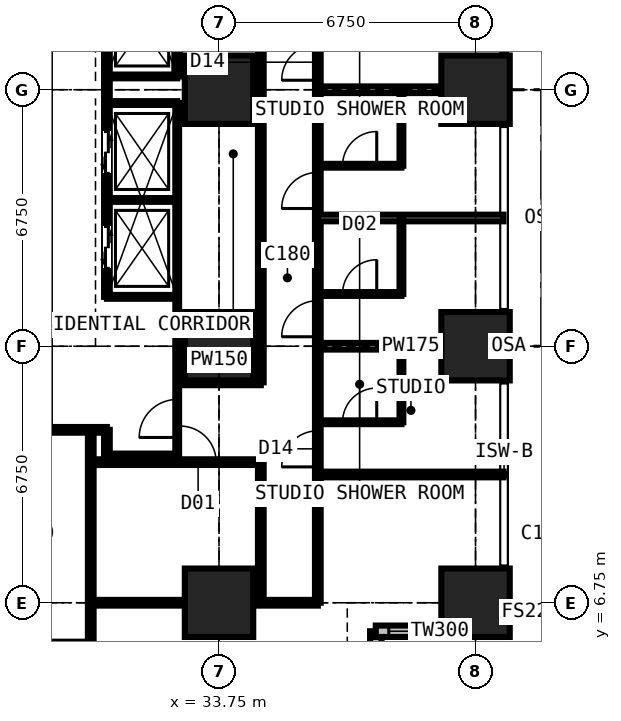
"""IFC4 building model, lengths in metres.
Left out: names, types, materials, properties, quantities, classifications, styles, units other than length and angle.
Written with IfcOpenShell. Run it as: python <this file> out.ifc"""

import sys

from ifc_helpers import new_model, si_unit, direction, frame, frame_2d, origin, origin_2d, place, context, subcontext, project, spatial, rectangle, extrude, element, fill, save


model = new_model("IFC4")
c1 = context("Model", 3, precision=1e-05, world=origin(), true_north=direction((0.0, 1.0)))
c2 = subcontext(c1, "Body", "Model", "MODEL_VIEW")
j1 = project(units=[si_unit("LENGTHUNIT", "METRE"), si_unit("PLANEANGLEUNIT", "RADIAN")], contexts=[c1])
p1 = place(None, origin())
s1 = spatial("IfcSite", under=j1, at=p1, CompositionType="ELEMENT")
p2 = place(p1, origin())
s2 = spatial("IfcBuilding", under=s1, at=p2, CompositionType="ELEMENT")
p3 = place(p2, frame((0.0, 0.0, 98.1)))
s3 = spatial("IfcBuildingStorey", under=s2, at=p3, CompositionType="ELEMENT", Elevation=98.1)
for number, where, z_axis, x_axis in (
    (1, (33.75, 6.75, 0.0), (0.0, 0.0, 1.0), (1.0, 0.0, 0.0)),
    (2, (33.75, 13.5, 0.0), (0.0, 0.0, 1.0), (1.0, 0.0, 0.0)),
    (3, (33.75, 20.25, 0.0), (0.0, 0.0, 1.0), (1.0, 0.0, 0.0)),
    (4, (40.5, 6.75, 0.0), (0.0, 0.0, 1.0), (1.0, 0.0, 0.0)),
    (5, (40.5, 13.5, 0.0), (0.0, 0.0, 1.0), (1.0, 0.0, 0.0)),
    (6, (40.5, 20.25, 0.0), (0.0, 0.0, 1.0), (1.0, 0.0, 0.0)),
):
    element("IfcColumn", number, at=place(p3, frame(where, z_axis=z_axis, x_axis=x_axis)), inside=s3, PredefinedType="COLUMN", context=c2, shape_type="SweptSolid", body=[
        extrude(rectangle(XDim=1.8, YDim=1.8, at=origin_2d()), origin(), (0.0, 0.0, 1.0), 3.6),
    ])
p4 = place(p3, frame((37.875, 2.625, 0.0), z_axis=(0.0, 0.0, 1.0), x_axis=(0.0, 1.0, 0.0)))
e7 = element("IfcWall", 7, at=p4, inside=s3, PredefinedType="SOLIDWALL", context=c2, shape_type="SweptSolid", body=[
    extrude(rectangle(XDim=3.375, YDim=0.3, at=frame_2d((1.688, 0.0))), origin(), (0.0, 0.0, 1.0), 3.375),
])
p5 = place(p4, frame((0.788, 0.0, 0.6)))
e8 = element("IfcOpeningElement", 8, at=p5, cuts=e7, PredefinedType="OPENING", context=c2, shape_type="SweptSolid", body=[
    extrude(rectangle(XDim=1.8, YDim=2.1, at=frame_2d((0.9, 1.05))), frame((0.0, 0.16, 0.0), z_axis=(0.0, -1.0, 0.0), x_axis=(1.0, 0.0, 0.0)), (0.0, 0.0, 1.0), 0.32),
])
p6 = place(p3, frame((37.875, 6.0, 0.0), z_axis=(0.0, 0.0, 1.0), x_axis=(1.0, 0.0, 0.0)))
e9 = element("IfcWall", 9, at=p6, inside=s3, PredefinedType="SOLIDWALL", context=c2, shape_type="SweptSolid", body=[
    extrude(rectangle(XDim=3.375, YDim=0.3, at=frame_2d((1.688, 0.0))), origin(), (0.0, 0.0, 1.0), 3.375),
])
p7 = place(p6, frame((0.343, 0.0, 0.9)))
e10 = element("IfcOpeningElement", 10, at=p7, cuts=e9, PredefinedType="OPENING", context=c2, shape_type="SweptSolid", body=[
    extrude(rectangle(XDim=1.2, YDim=1.8, at=frame_2d((0.6, 0.9))), frame((0.0, 0.16, 0.0), z_axis=(0.0, -1.0, 0.0), x_axis=(1.0, 0.0, 0.0)), (0.0, 0.0, 1.0), 0.32),
])
p8 = place(p3, frame((10.125, 11.3, 0.0), z_axis=(0.0, 0.0, 1.0), x_axis=(1.0, 0.0, 0.0)))
e11 = element("IfcWall", 11, at=p8, inside=s3, PredefinedType="PARTITIONING", context=c2, shape_type="SweptSolid", body=[
    extrude(rectangle(XDim=20.675, YDim=0.15, at=frame_2d((10.337, 0.0))), origin(), (0.0, 0.0, 1.0), 3.375),
])
p9 = place(p8, frame((5.2, 0.0, 0.0)))
e12 = element("IfcOpeningElement", 12, at=p9, cuts=e11, PredefinedType="OPENING", context=c2, shape_type="SweptSolid", body=[
    extrude(rectangle(XDim=1.0, YDim=2.2, at=frame_2d((0.5, 1.1))), frame((0.0, 0.085, 0.0), z_axis=(0.0, -1.0, 0.0), x_axis=(1.0, 0.0, 0.0)), (0.0, 0.0, 1.0), 0.17),
])
p10 = place(p8, frame((11.312, 0.0, 0.0)))
e13 = element("IfcOpeningElement", 13, at=p10, cuts=e11, PredefinedType="OPENING", context=c2, shape_type="SweptSolid", body=[
    extrude(rectangle(XDim=1.0, YDim=2.2, at=frame_2d((0.5, 1.1))), frame((0.0, 0.085, 0.0), z_axis=(0.0, -1.0, 0.0), x_axis=(1.0, 0.0, 0.0)), (0.0, 0.0, 1.0), 0.17),
])
p11 = place(p8, frame((3.225, 0.0, 0.0)))
e14 = element("IfcOpeningElement", 14, at=p11, cuts=e11, PredefinedType="OPENING", context=c2, shape_type="SweptSolid", body=[
    extrude(rectangle(XDim=0.95, YDim=2.2, at=frame_2d((0.475, 1.1))), frame((0.0, 0.085, 0.0), z_axis=(0.0, -1.0, 0.0), x_axis=(1.0, 0.0, 0.0)), (0.0, 0.0, 1.0), 0.17),
])
p12 = place(p3, frame((30.375, -0.734, 0.0), z_axis=(0.0, 0.0, 1.0), x_axis=(0.0, 1.0, 0.0)))
e15 = element("IfcWall", 15, at=p12, inside=s3, PredefinedType="PARTITIONING", context=c2, shape_type="SweptSolid", body=[
    extrude(rectangle(XDim=12.034, YDim=0.15, at=frame_2d((6.017, 0.0))), origin(), (0.0, 0.0, 1.0), 3.375),
])
p13 = place(p12, frame((5.134, 0.0, 0.0)))
e16 = element("IfcOpeningElement", 16, at=p13, cuts=e15, PredefinedType="OPENING", context=c2, shape_type="SweptSolid", body=[
    extrude(rectangle(XDim=1.0, YDim=2.2, at=frame_2d((0.5, 1.1))), frame((0.0, 0.085, 0.0), z_axis=(0.0, -1.0, 0.0), x_axis=(1.0, 0.0, 0.0)), (0.0, 0.0, 1.0), 0.17),
])
p14 = place(p3, frame((30.375, 6.75, 0.0), z_axis=(0.0, 0.0, 1.0), x_axis=(1.0, 0.0, 0.0)))
e17 = element("IfcWall", 17, at=p14, inside=s3, PredefinedType="PARTITIONING", context=c2, shape_type="SweptSolid", body=[
    extrude(rectangle(XDim=5.975, YDim=0.15, at=frame_2d((2.988, 0.0))), origin(), (0.0, 0.0, 1.0), 2.877),
])
p15 = place(p3, frame((30.375, 10.45, 0.0), z_axis=(0.0, 0.0, 1.0), x_axis=(1.0, 0.0, 0.0)))
e18 = element("IfcWall", 18, at=p15, inside=s3, PredefinedType="PARTITIONING", context=c2, shape_type="SweptSolid", body=[
    extrude(rectangle(XDim=4.475, YDim=0.15, at=frame_2d((2.238, 0.0))), origin(), (0.0, 0.0, 1.0), 3.375),
])
p16 = place(p15, frame((2.35, 0.0, 0.0)))
e19 = element("IfcOpeningElement", 19, at=p16, cuts=e18, PredefinedType="OPENING", context=c2, shape_type="SweptSolid", body=[
    extrude(rectangle(XDim=0.95, YDim=2.2, at=frame_2d((0.475, 1.1))), frame((0.0, 0.085, 0.0), z_axis=(0.0, -1.0, 0.0), x_axis=(1.0, 0.0, 0.0)), (0.0, 0.0, 1.0), 0.17),
])
p17 = place(p3, frame((30.8, 10.6, 0.0), z_axis=(0.0, 0.0, 1.0), x_axis=(0.0, 1.0, 0.0)))
e20 = element("IfcWall", 20, at=p17, inside=s3, PredefinedType="PARTITIONING", context=c2, shape_type="SweptSolid", body=[
    extrude(rectangle(XDim=0.7, YDim=0.15, at=frame_2d((0.35, 0.0))), origin(), (0.0, 0.0, 1.0), 3.375),
])
p18 = place(p3, frame((30.8, 10.6, 0.0), z_axis=(0.0, 0.0, 1.0), x_axis=(1.0, 0.0, 0.0)))
e21 = element("IfcWall", 21, at=p18, inside=s3, PredefinedType="PARTITIONING", context=c2, shape_type="SweptSolid", body=[
    extrude(rectangle(XDim=1.85, YDim=0.15, at=frame_2d((0.925, 0.0))), origin(), (0.0, 0.0, 1.0), 3.375),
])
p19 = place(p3, frame((30.8, 14.8, 0.0), z_axis=(0.0, 0.0, 1.0), x_axis=(0.0, 1.0, 0.0)))
e22 = element("IfcWall", 22, at=p19, inside=s3, PredefinedType="PARTITIONING", context=c2, shape_type="SweptSolid", body=[
    extrude(rectangle(XDim=10.9, YDim=0.15, at=frame_2d((5.45, 0.0))), origin(), (0.0, 0.0, 1.0), 3.375),
])
p20 = place(p19, frame((0.75, 0.0, 0.0)))
e23 = element("IfcOpeningElement", 23, at=p20, cuts=e22, PredefinedType="OPENING", context=c2, shape_type="SweptSolid", body=[
    extrude(rectangle(XDim=1.1, YDim=2.2, at=frame_2d((0.55, 1.1))), frame((0.0, 0.085, 0.0), z_axis=(0.0, -1.0, 0.0), x_axis=(1.0, 0.0, 0.0)), (0.0, 0.0, 1.0), 0.17),
])
p21 = place(p19, frame((3.25, 0.0, 0.0)))
e24 = element("IfcOpeningElement", 24, at=p21, cuts=e22, PredefinedType="OPENING", context=c2, shape_type="SweptSolid", body=[
    extrude(rectangle(XDim=1.1, YDim=2.2, at=frame_2d((0.55, 1.1))), frame((0.0, 0.085, 0.0), z_axis=(0.0, -1.0, 0.0), x_axis=(1.0, 0.0, 0.0)), (0.0, 0.0, 1.0), 0.17),
])
p22 = place(p19, frame((6.5, 0.0, 0.0)))
e25 = element("IfcOpeningElement", 25, at=p22, cuts=e22, PredefinedType="OPENING", context=c2, shape_type="SweptSolid", body=[
    extrude(rectangle(XDim=1.1, YDim=2.2, at=frame_2d((0.55, 1.1))), frame((0.0, 0.085, 0.0), z_axis=(0.0, -1.0, 0.0), x_axis=(1.0, 0.0, 0.0)), (0.0, 0.0, 1.0), 0.17),
])
p23 = place(p19, frame((9.05, 0.0, 0.0)))
e26 = element("IfcOpeningElement", 26, at=p23, cuts=e22, PredefinedType="OPENING", context=c2, shape_type="SweptSolid", body=[
    extrude(rectangle(XDim=1.1, YDim=2.2, at=frame_2d((0.55, 1.1))), frame((0.0, 0.085, 0.0), z_axis=(0.0, -1.0, 0.0), x_axis=(1.0, 0.0, 0.0)), (0.0, 0.0, 1.0), 0.17),
])
for number, where, z_axis, x_axis in (
    (27, (30.8, 14.8, 0.0), (0.0, 0.0, 1.0), (1.0, 0.0, 0.0)),
    (28, (30.8, 17.35, 0.0), (0.0, 0.0, 1.0), (1.0, 0.0, 0.0)),
    (29, (30.8, 19.9, 0.0), (0.0, 0.0, 1.0), (1.0, 0.0, 0.0)),
    (30, (30.8, 20.6, 0.0), (0.0, 0.0, 1.0), (1.0, 0.0, 0.0)),
):
    element("IfcWall", number, at=place(p3, frame(where, z_axis=z_axis, x_axis=x_axis)), inside=s3, PredefinedType="SHEAR", context=c2, shape_type="SweptSolid", body=[
        extrude(rectangle(XDim=1.85, YDim=0.1, at=frame_2d((0.925, 0.0))), origin(), (0.0, 0.0, 1.0), 3.375),
    ])
p24 = place(p3, frame((32.65, 10.6, 0.0), z_axis=(0.0, 0.0, 1.0), x_axis=(0.0, 1.0, 0.0)))
e31 = element("IfcWall", 31, at=p24, inside=s3, PredefinedType="SHEAR", context=c2, shape_type="SweptSolid", body=[
    extrude(rectangle(XDim=9.3, YDim=0.1, at=frame_2d((4.65, 0.0))), origin(), (0.0, 0.0, 1.0), 3.375),
])
p25 = place(p24, frame((0.5, 0.0, 0.0)))
e32 = element("IfcOpeningElement", 32, at=p25, cuts=e31, PredefinedType="OPENING", context=c2, shape_type="SweptSolid", body=[
    extrude(rectangle(XDim=1.0, YDim=2.2, at=frame_2d((0.5, 1.1))), frame((0.0, 0.06, 0.0), z_axis=(0.0, -1.0, 0.0), x_axis=(1.0, 0.0, 0.0)), (0.0, 0.0, 1.0), 0.12),
])
p26 = place(p3, frame((32.65, 12.55, 0.0), z_axis=(0.0, 0.0, 1.0), x_axis=(1.0, 0.0, 0.0)))
e33 = element("IfcWall", 33, at=p26, inside=s3, PredefinedType="PARTITIONING", context=c2, shape_type="SweptSolid", body=[
    extrude(rectangle(XDim=2.2, YDim=0.15, at=frame_2d((1.1, 0.0))), origin(), (0.0, 0.0, 1.0), 3.375),
])
p27 = place(p3, frame((32.65, 20.6, 0.0), z_axis=(0.0, 0.0, 1.0), x_axis=(0.0, 1.0, 0.0)))
e34 = element("IfcWall", 34, at=p27, inside=s3, PredefinedType="PARTITIONING", context=c2, shape_type="SweptSolid", body=[
    extrude(rectangle(XDim=5.1, YDim=0.15, at=frame_2d((2.55, 0.0))), origin(), (0.0, 0.0, 1.0), 3.375),
])
p28 = place(p3, frame((34.85, 6.75, 0.0), z_axis=(0.0, 0.0, 1.0), x_axis=(0.0, 1.0, 0.0)))
e35 = element("IfcWall", 35, at=p28, inside=s3, PredefinedType="PARTITIONING", context=c2, shape_type="SweptSolid", body=[
    extrude(rectangle(XDim=3.7, YDim=0.15, at=frame_2d((1.85, 0.0))), origin(), (0.0, 0.0, 1.0), 3.375),
])
p29 = place(p3, frame((34.85, 12.55, 0.0), z_axis=(0.0, 0.0, 1.0), x_axis=(0.0, 1.0, 0.0)))
e36 = element("IfcWall", 36, at=p29, inside=s3, PredefinedType="PARTITIONING", context=c2, shape_type="SweptSolid", body=[
    extrude(rectangle(XDim=17.825, YDim=0.15, at=frame_2d((8.913, 0.0))), origin(), (0.0, 0.0, 1.0), 3.375),
])
p30 = place(p29, frame((8.6, 0.0, 0.0)))
e37 = element("IfcOpeningElement", 37, at=p30, cuts=e36, PredefinedType="OPENING", context=c2, shape_type="SweptSolid", body=[
    extrude(rectangle(XDim=0.95, YDim=2.2, at=frame_2d((0.475, 1.1))), frame((0.0, 0.085, 0.0), z_axis=(0.0, -1.0, 0.0), x_axis=(1.0, 0.0, 0.0)), (0.0, 0.0, 1.0), 0.17),
])
p31 = place(p3, frame((36.35, 6.75, 0.0), z_axis=(0.0, 0.0, 1.0), x_axis=(0.0, 1.0, 0.0)))
e38 = element("IfcWall", 38, at=p31, inside=s3, PredefinedType="PARTITIONING", context=c2, shape_type="SweptSolid", body=[
    extrude(rectangle(XDim=20.25, YDim=0.15, at=frame_2d((10.125, 0.0))), origin(), (0.0, 0.0, 1.0), 3.375),
])
p32 = place(p31, frame((3.575, 0.0, 0.0)))
e39 = element("IfcOpeningElement", 39, at=p32, cuts=e38, PredefinedType="OPENING", context=c2, shape_type="SweptSolid", body=[
    extrude(rectangle(XDim=0.95, YDim=2.2, at=frame_2d((0.475, 1.1))), frame((0.0, 0.085, 0.0), z_axis=(0.0, -1.0, 0.0), x_axis=(1.0, 0.0, 0.0)), (0.0, 0.0, 1.0), 0.17),
])
p33 = place(p31, frame((7.0, 0.0, 0.0)))
e40 = element("IfcOpeningElement", 40, at=p33, cuts=e38, PredefinedType="OPENING", context=c2, shape_type="SweptSolid", body=[
    extrude(rectangle(XDim=0.95, YDim=2.2, at=frame_2d((0.475, 1.1))), frame((0.0, 0.085, 0.0), z_axis=(0.0, -1.0, 0.0), x_axis=(1.0, 0.0, 0.0)), (0.0, 0.0, 1.0), 0.17),
])
p34 = place(p31, frame((10.375, 0.0, 0.0)))
e41 = element("IfcOpeningElement", 41, at=p34, cuts=e38, PredefinedType="OPENING", context=c2, shape_type="SweptSolid", body=[
    extrude(rectangle(XDim=0.95, YDim=2.2, at=frame_2d((0.475, 1.1))), frame((0.0, 0.085, 0.0), z_axis=(0.0, -1.0, 0.0), x_axis=(1.0, 0.0, 0.0)), (0.0, 0.0, 1.0), 0.17),
])
p35 = place(p31, frame((13.75, 0.0, 0.0)))
e42 = element("IfcOpeningElement", 42, at=p35, cuts=e38, PredefinedType="OPENING", context=c2, shape_type="SweptSolid", body=[
    extrude(rectangle(XDim=0.95, YDim=2.2, at=frame_2d((0.475, 1.1))), frame((0.0, 0.085, 0.0), z_axis=(0.0, -1.0, 0.0), x_axis=(1.0, 0.0, 0.0)), (0.0, 0.0, 1.0), 0.17),
])
p36 = place(p31, frame((17.125, 0.0, 0.0)))
e43 = element("IfcOpeningElement", 43, at=p36, cuts=e38, PredefinedType="OPENING", context=c2, shape_type="SweptSolid", body=[
    extrude(rectangle(XDim=0.95, YDim=2.2, at=frame_2d((0.475, 1.1))), frame((0.0, 0.085, 0.0), z_axis=(0.0, -1.0, 0.0), x_axis=(1.0, 0.0, 0.0)), (0.0, 0.0, 1.0), 0.17),
])
p37 = place(p3, frame((36.35, 10.125, 0.0), z_axis=(0.0, 0.0, 1.0), x_axis=(1.0, 0.0, 0.0)))
e44 = element("IfcWall", 44, at=p37, inside=s3, PredefinedType="PARTITIONING", context=c2, shape_type="SweptSolid", body=[
    extrude(rectangle(XDim=4.884, YDim=0.15, at=frame_2d((2.442, 0.0))), origin(), (0.0, 0.0, 1.0), 3.375),
])
p38 = place(p3, frame((36.35, 11.5, 0.0), z_axis=(0.0, 0.0, 1.0), x_axis=(1.0, 0.0, 0.0)))
e45 = element("IfcWall", 45, at=p38, inside=s3, PredefinedType="PARTITIONING", context=c2, shape_type="SweptSolid", body=[
    extrude(rectangle(XDim=2.2, YDim=0.1, at=frame_2d((1.1, 0.0))), origin(), (0.0, 0.0, 1.0), 3.375),
])
p39 = place(p38, frame((0.65, 0.0, 0.0)))
e46 = element("IfcOpeningElement", 46, at=p39, cuts=e45, PredefinedType="OPENING", context=c2, shape_type="SweptSolid", body=[
    extrude(rectangle(XDim=0.9, YDim=2.2, at=frame_2d((0.45, 1.1))), frame((0.0, 0.06, 0.0), z_axis=(0.0, -1.0, 0.0), x_axis=(1.0, 0.0, 0.0)), (0.0, 0.0, 1.0), 0.12),
])
p40 = place(p3, frame((36.35, 13.5, 0.0), z_axis=(0.0, 0.0, 1.0), x_axis=(1.0, 0.0, 0.0)))
e47 = element("IfcWall", 47, at=p40, inside=s3, PredefinedType="PARTITIONING", context=c2, shape_type="SweptSolid", body=[
    extrude(rectangle(XDim=4.884, YDim=0.175, at=frame_2d((2.442, 0.0))), origin(), (0.0, 0.0, 1.0), 2.61),
])
p41 = place(p3, frame((36.35, 14.875, 0.0), z_axis=(0.0, 0.0, 1.0), x_axis=(1.0, 0.0, 0.0)))
e48 = element("IfcWall", 48, at=p41, inside=s3, PredefinedType="PARTITIONING", context=c2, shape_type="SweptSolid", body=[
    extrude(rectangle(XDim=2.2, YDim=0.1, at=frame_2d((1.1, 0.0))), origin(), (0.0, 0.0, 1.0), 3.375),
])
p42 = place(p41, frame((0.65, 0.0, 0.0)))
e49 = element("IfcOpeningElement", 49, at=p42, cuts=e48, PredefinedType="OPENING", context=c2, shape_type="SweptSolid", body=[
    extrude(rectangle(XDim=0.9, YDim=2.2, at=frame_2d((0.45, 1.1))), frame((0.0, 0.06, 0.0), z_axis=(0.0, -1.0, 0.0), x_axis=(1.0, 0.0, 0.0)), (0.0, 0.0, 1.0), 0.12),
])
p43 = place(p3, frame((36.35, 16.875, 0.0), z_axis=(0.0, 0.0, 1.0), x_axis=(1.0, 0.0, 0.0)))
e50 = element("IfcWall", 50, at=p43, inside=s3, PredefinedType="PARTITIONING", context=c2, shape_type="SweptSolid", body=[
    extrude(rectangle(XDim=4.884, YDim=0.175, at=frame_2d((2.442, 0.0))), origin(), (0.0, 0.0, 1.0), 3.375),
])
p44 = place(p3, frame((36.35, 18.25, 0.0), z_axis=(0.0, 0.0, 1.0), x_axis=(1.0, 0.0, 0.0)))
e51 = element("IfcWall", 51, at=p44, inside=s3, PredefinedType="PARTITIONING", context=c2, shape_type="SweptSolid", body=[
    extrude(rectangle(XDim=2.2, YDim=0.1, at=frame_2d((1.1, 0.0))), origin(), (0.0, 0.0, 1.0), 3.375),
])
p45 = place(p44, frame((0.65, 0.0, 0.0)))
e52 = element("IfcOpeningElement", 52, at=p45, cuts=e51, PredefinedType="OPENING", context=c2, shape_type="SweptSolid", body=[
    extrude(rectangle(XDim=0.9, YDim=2.2, at=frame_2d((0.45, 1.1))), frame((0.0, 0.06, 0.0), z_axis=(0.0, -1.0, 0.0), x_axis=(1.0, 0.0, 0.0)), (0.0, 0.0, 1.0), 0.12),
])
p46 = place(p3, frame((36.35, 20.25, 0.0), z_axis=(0.0, 0.0, 1.0), x_axis=(1.0, 0.0, 0.0)))
e53 = element("IfcWall", 53, at=p46, inside=s3, PredefinedType="PARTITIONING", context=c2, shape_type="SweptSolid", body=[
    extrude(rectangle(XDim=4.884, YDim=0.175, at=frame_2d((2.442, 0.0))), origin(), (0.0, 0.0, 1.0), 2.61),
])
for number, where, z_axis, x_axis in (
    (54, (38.55, 11.5, 0.0), (0.0, 0.0, 1.0), (0.0, 1.0, 0.0)),
    (55, (38.55, 14.875, 0.0), (0.0, 0.0, 1.0), (0.0, 1.0, 0.0)),
    (56, (38.55, 18.25, 0.0), (0.0, 0.0, 1.0), (0.0, 1.0, 0.0)),
):
    element("IfcWall", number, at=place(p3, frame(where, z_axis=z_axis, x_axis=x_axis)), inside=s3, PredefinedType="PARTITIONING", context=c2, shape_type="SweptSolid", body=[
        extrude(rectangle(XDim=2.0, YDim=0.1, at=frame_2d((1.0, 0.0))), origin(), (0.0, 0.0, 1.0), 3.375),
    ])
p47 = place(p7, origin())
e57 = element("IfcWindow", 57, at=p47, inside=s3, PartitioningType="SINGLE_PANEL", PredefinedType="WINDOW", context=c2, shape_type="SweptSolid", body=[
    extrude(rectangle(XDim=1.2, YDim=1.8, at=frame_2d((0.6, 0.9))), frame((0.0, 0.03, 0.0), z_axis=(0.0, -1.0, 0.0), x_axis=(1.0, 0.0, 0.0)), (0.0, 0.0, 1.0), 0.06),
])
fill(e10, e57)
p48 = place(p32, origin())
e58 = element("IfcDoor", 58, at=p48, inside=s3, OperationType="SINGLE_SWING_LEFT", PredefinedType="DOOR", context=c2, shape_type="SweptSolid", body=[
    extrude(rectangle(XDim=0.95, YDim=2.2, at=frame_2d((0.475, 1.1))), frame((0.0, 0.025, 0.0), z_axis=(0.0, -1.0, 0.0), x_axis=(1.0, 0.0, 0.0)), (0.0, 0.0, 1.0), 0.05),
])
fill(e39, e58)
p49 = place(p39, origin())
e59 = element("IfcDoor", 59, at=p49, inside=s3, OperationType="SINGLE_SWING_RIGHT", PredefinedType="DOOR", context=c2, shape_type="SweptSolid", body=[
    extrude(rectangle(XDim=0.9, YDim=2.2, at=frame_2d((0.45, 1.1))), frame((0.0, 0.025, 0.0), z_axis=(0.0, -1.0, 0.0), x_axis=(1.0, 0.0, 0.0)), (0.0, 0.0, 1.0), 0.05),
])
fill(e46, e59)
p50 = place(p33, origin())
e60 = element("IfcDoor", 60, at=p50, inside=s3, OperationType="SINGLE_SWING_LEFT", PredefinedType="DOOR", context=c2, shape_type="SweptSolid", body=[
    extrude(rectangle(XDim=0.95, YDim=2.2, at=frame_2d((0.475, 1.1))), frame((0.0, 0.025, 0.0), z_axis=(0.0, -1.0, 0.0), x_axis=(1.0, 0.0, 0.0)), (0.0, 0.0, 1.0), 0.05),
])
fill(e40, e60)
p51 = place(p42, origin())
e61 = element("IfcDoor", 61, at=p51, inside=s3, OperationType="SINGLE_SWING_RIGHT", PredefinedType="DOOR", context=c2, shape_type="SweptSolid", body=[
    extrude(rectangle(XDim=0.9, YDim=2.2, at=frame_2d((0.45, 1.1))), frame((0.0, 0.025, 0.0), z_axis=(0.0, -1.0, 0.0), x_axis=(1.0, 0.0, 0.0)), (0.0, 0.0, 1.0), 0.05),
])
fill(e49, e61)
p52 = place(p34, origin())
e62 = element("IfcDoor", 62, at=p52, inside=s3, OperationType="SINGLE_SWING_LEFT", PredefinedType="DOOR", context=c2, shape_type="SweptSolid", body=[
    extrude(rectangle(XDim=0.95, YDim=2.2, at=frame_2d((0.475, 1.1))), frame((0.0, 0.025, 0.0), z_axis=(0.0, -1.0, 0.0), x_axis=(1.0, 0.0, 0.0)), (0.0, 0.0, 1.0), 0.05),
])
fill(e41, e62)
p53 = place(p45, origin())
e63 = element("IfcDoor", 63, at=p53, inside=s3, OperationType="SINGLE_SWING_RIGHT", PredefinedType="DOOR", context=c2, shape_type="SweptSolid", body=[
    extrude(rectangle(XDim=0.9, YDim=2.2, at=frame_2d((0.45, 1.1))), frame((0.0, 0.025, 0.0), z_axis=(0.0, -1.0, 0.0), x_axis=(1.0, 0.0, 0.0)), (0.0, 0.0, 1.0), 0.05),
])
fill(e52, e63)
p54 = place(p35, origin())
e64 = element("IfcDoor", 64, at=p54, inside=s3, OperationType="SINGLE_SWING_LEFT", PredefinedType="DOOR", context=c2, shape_type="SweptSolid", body=[
    extrude(rectangle(XDim=0.95, YDim=2.2, at=frame_2d((0.475, 1.1))), frame((0.0, 0.025, 0.0), z_axis=(0.0, -1.0, 0.0), x_axis=(1.0, 0.0, 0.0)), (0.0, 0.0, 1.0), 0.05),
])
fill(e42, e64)
p55 = place(p25, origin())
e65 = element("IfcDoor", 65, at=p55, inside=s3, OperationType="SINGLE_SWING_LEFT", PredefinedType="DOOR", context=c2, shape_type="SweptSolid", body=[
    extrude(rectangle(XDim=1.0, YDim=2.2, at=frame_2d((0.5, 1.1))), frame((0.0, 0.025, 0.0), z_axis=(0.0, -1.0, 0.0), x_axis=(1.0, 0.0, 0.0)), (0.0, 0.0, 1.0), 0.05),
])
fill(e32, e65)
p56 = place(p30, origin())
e66 = element("IfcDoor", 66, at=p56, inside=s3, OperationType="SINGLE_SWING_LEFT", PredefinedType="DOOR", context=c2, shape_type="SweptSolid", body=[
    extrude(rectangle(XDim=0.95, YDim=2.2, at=frame_2d((0.475, 1.1))), frame((0.0, 0.025, 0.0), z_axis=(0.0, -1.0, 0.0), x_axis=(1.0, 0.0, 0.0)), (0.0, 0.0, 1.0), 0.05),
])
fill(e37, e66)
p57 = place(p16, origin())
e67 = element("IfcDoor", 67, at=p57, inside=s3, OperationType="SINGLE_SWING_LEFT", PredefinedType="DOOR", context=c2, shape_type="SweptSolid", body=[
    extrude(rectangle(XDim=0.95, YDim=2.2, at=frame_2d((0.475, 1.1))), frame((0.0, 0.025, 0.0), z_axis=(0.0, -1.0, 0.0), x_axis=(1.0, 0.0, 0.0)), (0.0, 0.0, 1.0), 0.05),
])
fill(e19, e67)
p58 = place(p20, origin())
e68 = element("IfcDoor", 68, at=p58, inside=s3, OperationType="DOUBLE_DOOR_SLIDING", PredefinedType="DOOR", context=c2, shape_type="SweptSolid", body=[
    extrude(rectangle(XDim=1.1, YDim=2.2, at=frame_2d((0.55, 1.1))), frame((0.0, 0.025, 0.0), z_axis=(0.0, -1.0, 0.0), x_axis=(1.0, 0.0, 0.0)), (0.0, 0.0, 1.0), 0.05),
])
fill(e23, e68)
p59 = place(p21, origin())
e69 = element("IfcDoor", 69, at=p59, inside=s3, OperationType="DOUBLE_DOOR_SLIDING", PredefinedType="DOOR", context=c2, shape_type="SweptSolid", body=[
    extrude(rectangle(XDim=1.1, YDim=2.2, at=frame_2d((0.55, 1.1))), frame((0.0, 0.025, 0.0), z_axis=(0.0, -1.0, 0.0), x_axis=(1.0, 0.0, 0.0)), (0.0, 0.0, 1.0), 0.05),
])
fill(e24, e69)
save(model, sys.argv[1])
